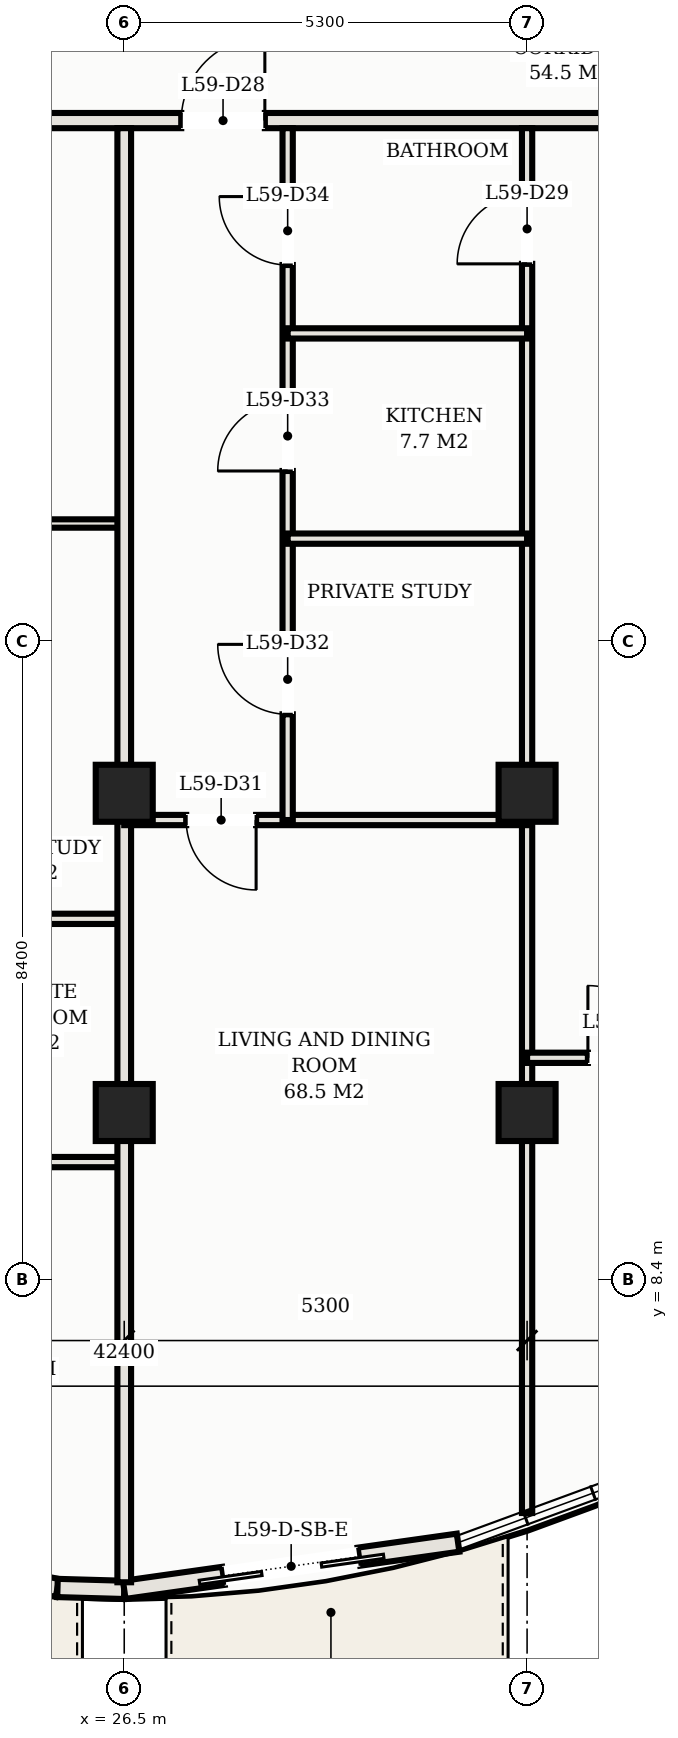
"""IFC4 building model, lengths in metres.
Left out: names, types, materials, properties, quantities, classifications, styles, units other than length and angle.
Written with IfcOpenShell. Run it as: python <this file> out.ifc"""

import sys

from ifc_helpers import new_model, si_unit, direction, frame, frame_2d, origin, origin_2d, place, context, subcontext, project, spatial, rectangle, hollow_rectangle, extrude, element, fill, save


model = new_model("IFC4")
c1 = context("Model", 3, precision=1e-05, world=origin(), true_north=direction((0.0, 1.0)))
c2 = subcontext(c1, "Body", "Model", "MODEL_VIEW")
j1 = project(units=[si_unit("LENGTHUNIT", "METRE"), si_unit("PLANEANGLEUNIT", "RADIAN")], contexts=[c1])
p1 = place(None, origin())
s1 = spatial("IfcSite", under=j1, at=p1, CompositionType="ELEMENT")
p2 = place(p1, origin())
s2 = spatial("IfcBuilding", under=s1, at=p2, CompositionType="ELEMENT")
p3 = place(p2, frame((0.0, 0.0, 216.5)))
s3 = spatial("IfcBuildingStorey", under=s2, at=p3, CompositionType="ELEMENT", Elevation=216.5)
for number, where, z_axis, x_axis in (
    (1, (26.5, 14.8, 0.0), (0.0, 0.0, 1.0), (1.0, 0.0, 0.0)),
    (2, (26.5, 10.6, 0.0), (0.0, 0.0, 1.0), (1.0, 0.0, 0.0)),
    (3, (31.8, 14.8, 0.0), (0.0, 0.0, 1.0), (1.0, 0.0, 0.0)),
    (4, (31.8, 10.6, 0.0), (0.0, 0.0, 1.0), (1.0, 0.0, 0.0)),
):
    element("IfcColumn", number, at=place(p3, frame(where, z_axis=z_axis, x_axis=x_axis)), inside=s3, PredefinedType="COLUMN", context=c2, shape_type="SweptSolid", body=[
        extrude(hollow_rectangle(XDim=0.75, YDim=0.75, WallThickness=0.025, at=origin_2d()), origin(), (0.0, 0.0, 1.0), 3.3),
    ])
p4 = place(p3, frame((21.229, 5.214, 0.0), z_axis=(0.0, 0.0, 1.0), x_axis=(0.980985349685, -0.194081796425, 0.0)))
e5 = element("IfcWall", 5, at=p4, inside=s3, PredefinedType="SOLIDWALL", context=c2, shape_type="SweptSolid", body=[
    extrude(rectangle(XDim=4.478, YDim=0.24, at=frame_2d((2.239, 0.0))), origin(), (0.0, 0.0, 1.0), 3.11),
])
p5 = place(p4, frame((1.381, 0.0, 0.0)))
e6 = element("IfcOpeningElement", 6, at=p5, cuts=e5, PredefinedType="OPENING", context=c2, shape_type="SweptSolid", body=[
    extrude(rectangle(XDim=1.8, YDim=2.2, at=frame_2d((0.9, 1.1))), frame((0.0, 0.13, 0.0), z_axis=(0.0, -1.0, 0.0), x_axis=(1.0, 0.0, 0.0)), (0.0, 0.0, 1.0), 0.26),
])
p6 = place(p3, frame((25.622, 4.345, 0.0), z_axis=(0.0, 0.0, 1.0), x_axis=(0.999597960231, -0.028353446035, 0.0)))
e7 = element("IfcWall", 7, at=p6, inside=s3, PredefinedType="SOLIDWALL", context=c2, shape_type="SweptSolid", body=[
    extrude(rectangle(XDim=0.878, YDim=0.24, at=frame_2d((0.439, 0.0))), origin(), (0.0, 0.0, 1.0), 3.11),
])
p7 = place(p3, frame((26.5, 4.32, 0.0), z_axis=(0.0, 0.0, 1.0), x_axis=(0.990156470874, 0.139964864115, 0.0)))
e8 = element("IfcWall", 8, at=p7, inside=s3, PredefinedType="SOLIDWALL", context=c2, shape_type="SweptSolid", body=[
    extrude(rectangle(XDim=4.436, YDim=0.24, at=frame_2d((2.218, 0.0))), origin(), (0.0, 0.0, 1.0), 3.11),
])
p8 = place(p7, frame((1.318, 0.0, 0.0)))
e9 = element("IfcOpeningElement", 9, at=p8, cuts=e8, PredefinedType="OPENING", context=c2, shape_type="SweptSolid", body=[
    extrude(rectangle(XDim=1.8, YDim=2.2, at=frame_2d((0.9, 1.1))), frame((0.0, 0.13, 0.0), z_axis=(0.0, -1.0, 0.0), x_axis=(1.0, 0.0, 0.0)), (0.0, 0.0, 1.0), 0.26),
])
p9 = place(p3, frame((6.72, 23.65, 0.0), z_axis=(0.0, 0.0, 1.0), x_axis=(1.0, 0.0, 0.0)))
e10 = element("IfcWall", 10, at=p9, inside=s3, PredefinedType="PARTITIONING", context=c2, shape_type="SweptSolid", body=[
    extrude(rectangle(XDim=39.56, YDim=0.2, at=frame_2d((19.78, 0.0))), origin(), (0.0, 0.0, 1.0), 2.43),
])
p10 = place(p9, frame((4.63, 0.0, 0.0)))
e11 = element("IfcOpeningElement", 11, at=p10, cuts=e10, PredefinedType="OPENING", context=c2, shape_type="SweptSolid", body=[
    extrude(rectangle(XDim=1.1, YDim=2.25, at=frame_2d((0.55, 1.125))), frame((0.0, 0.11, 0.0), z_axis=(0.0, -1.0, 0.0), x_axis=(1.0, 0.0, 0.0)), (0.0, 0.0, 1.0), 0.22),
])
p11 = place(p9, frame((20.53, 0.0, 0.0)))
e12 = element("IfcOpeningElement", 12, at=p11, cuts=e10, PredefinedType="OPENING", context=c2, shape_type="SweptSolid", body=[
    extrude(rectangle(XDim=1.1, YDim=2.25, at=frame_2d((0.55, 1.125))), frame((0.0, 0.11, 0.0), z_axis=(0.0, -1.0, 0.0), x_axis=(1.0, 0.0, 0.0)), (0.0, 0.0, 1.0), 0.22),
])
p12 = place(p9, frame((2.085, 0.0, 0.0)))
e13 = element("IfcOpeningElement", 13, at=p12, cuts=e10, PredefinedType="OPENING", context=c2, shape_type="SweptSolid", body=[
    extrude(rectangle(XDim=0.92, YDim=2.15, at=frame_2d((0.46, 1.075))), frame((0.0, 0.11, 0.0), z_axis=(0.0, -1.0, 0.0), x_axis=(1.0, 0.0, 0.0)), (0.0, 0.0, 1.0), 0.22),
])
p13 = place(p9, frame((36.555, 0.0, 0.0)))
e14 = element("IfcOpeningElement", 14, at=p13, cuts=e10, PredefinedType="OPENING", context=c2, shape_type="SweptSolid", body=[
    extrude(rectangle(XDim=0.92, YDim=2.15, at=frame_2d((0.46, 1.075))), frame((0.0, 0.11, 0.0), z_axis=(0.0, -1.0, 0.0), x_axis=(1.0, 0.0, 0.0)), (0.0, 0.0, 1.0), 0.22),
])
p14 = place(p3, frame((21.2, 9.948, 0.0), z_axis=(0.0, 0.0, 1.0), x_axis=(1.0, 0.0, 0.0)))
e15 = element("IfcWall", 15, at=p14, inside=s3, PredefinedType="PARTITIONING", context=c2, shape_type="SweptSolid", body=[
    extrude(rectangle(XDim=5.3, YDim=0.135, at=frame_2d((2.65, 0.0))), origin(), (0.0, 0.0, 1.0), 2.43),
])
p15 = place(p14, frame((0.8, 0.0, 0.0)))
e16 = element("IfcOpeningElement", 16, at=p15, cuts=e15, PredefinedType="OPENING", context=c2, shape_type="SweptSolid", body=[
    extrude(rectangle(XDim=0.95, YDim=2.15, at=frame_2d((0.475, 1.075))), frame((0.0, 0.078, 0.0), z_axis=(0.0, -1.0, 0.0), x_axis=(1.0, 0.0, 0.0)), (0.0, 0.0, 1.0), 0.155),
])
p16 = place(p14, frame((2.875, 0.0, 0.0)))
e17 = element("IfcOpeningElement", 17, at=p16, cuts=e15, PredefinedType="OPENING", context=c2, shape_type="SweptSolid", body=[
    extrude(rectangle(XDim=0.9, YDim=2.15, at=frame_2d((0.45, 1.075))), frame((0.0, 0.078, 0.0), z_axis=(0.0, -1.0, 0.0), x_axis=(1.0, 0.0, 0.0)), (0.0, 0.0, 1.0), 0.155),
])
p17 = place(p3, frame((23.35, 13.148, 0.0), z_axis=(0.0, 0.0, 1.0), x_axis=(1.0, 0.0, 0.0)))
e18 = element("IfcWall", 18, at=p17, inside=s3, PredefinedType="PARTITIONING", context=c2, shape_type="SweptSolid", body=[
    extrude(rectangle(XDim=3.15, YDim=0.135, at=frame_2d((1.575, 0.0))), origin(), (0.0, 0.0, 1.0), 2.43),
])
p18 = place(p3, frame((23.35, 18.349, 0.0), z_axis=(0.0, 0.0, 1.0), x_axis=(1.0, 0.0, 0.0)))
e19 = element("IfcWall", 19, at=p18, inside=s3, PredefinedType="MOVABLE", context=c2, shape_type="SweptSolid", body=[
    extrude(rectangle(XDim=3.15, YDim=0.11, at=frame_2d((1.575, 0.0))), origin(), (0.0, 0.0, 1.0), 2.43),
])
p19 = place(p18, frame((1.115, 0.0, 0.0)))
e20 = element("IfcOpeningElement", 20, at=p19, cuts=e19, PredefinedType="OPENING", context=c2, shape_type="SweptSolid", body=[
    extrude(rectangle(XDim=0.92, YDim=2.15, at=frame_2d((0.46, 1.075))), frame((0.0, 0.065, 0.0), z_axis=(0.0, -1.0, 0.0), x_axis=(1.0, 0.0, 0.0)), (0.0, 0.0, 1.0), 0.13),
])
p20 = place(p3, frame((26.5, 4.42, 0.0), z_axis=(0.0, 0.0, 1.0), x_axis=(0.0, 1.0, 0.0)))
e21 = element("IfcWall", 21, at=p20, inside=s3, PredefinedType="PARTITIONING", context=c2, shape_type="SweptSolid", body=[
    extrude(rectangle(XDim=19.13, YDim=0.18, at=frame_2d((9.565, 0.0))), origin(), (0.0, 0.0, 1.0), 2.43),
])
p21 = place(p3, frame((31.8, 5.331, 0.0), z_axis=(0.0, 0.0, 1.0), x_axis=(0.0, 1.0, 0.0)))
e22 = element("IfcWall", 22, at=p21, inside=s3, PredefinedType="PARTITIONING", context=c2, shape_type="SweptSolid", body=[
    extrude(rectangle(XDim=18.219, YDim=0.135, at=frame_2d((9.109, 0.0))), origin(), (0.0, 0.0, 1.0), 2.43),
])
p22 = place(p21, frame((16.434, 0.0, 0.0)))
e23 = element("IfcOpeningElement", 23, at=p22, cuts=e22, PredefinedType="OPENING", context=c2, shape_type="SweptSolid", body=[
    extrude(rectangle(XDim=0.92, YDim=2.15, at=frame_2d((0.46, 1.075))), frame((0.0, 0.078, 0.0), z_axis=(0.0, -1.0, 0.0), x_axis=(1.0, 0.0, 0.0)), (0.0, 0.0, 1.0), 0.155),
])
p23 = place(p3, frame((26.5, 14.448, 0.0), z_axis=(0.0, 0.0, 1.0), x_axis=(1.0, 0.0, 0.0)))
e24 = element("IfcWall", 24, at=p23, inside=s3, PredefinedType="PARTITIONING", context=c2, shape_type="SweptSolid", body=[
    extrude(rectangle(XDim=5.3, YDim=0.135, at=frame_2d((2.65, 0.0))), origin(), (0.0, 0.0, 1.0), 2.43),
])
p24 = place(p23, frame((0.815, 0.0, 0.0)))
e25 = element("IfcOpeningElement", 25, at=p24, cuts=e24, PredefinedType="OPENING", context=c2, shape_type="SweptSolid", body=[
    extrude(rectangle(XDim=0.92, YDim=2.15, at=frame_2d((0.46, 1.075))), frame((0.0, 0.078, 0.0), z_axis=(0.0, -1.0, 0.0), x_axis=(1.0, 0.0, 0.0)), (0.0, 0.0, 1.0), 0.155),
])
p25 = place(p3, frame((28.65, 14.448, 0.0), z_axis=(0.0, 0.0, 1.0), x_axis=(0.0, 1.0, 0.0)))
e26 = element("IfcWall", 26, at=p25, inside=s3, PredefinedType="PARTITIONING", context=c2, shape_type="SweptSolid", body=[
    extrude(rectangle(XDim=9.102, YDim=0.135, at=frame_2d((4.551, 0.0))), origin(), (0.0, 0.0, 1.0), 2.43),
])
p26 = place(p25, frame((1.391, 0.0, 0.0)))
e27 = element("IfcOpeningElement", 27, at=p26, cuts=e26, PredefinedType="OPENING", context=c2, shape_type="SweptSolid", body=[
    extrude(rectangle(XDim=0.92, YDim=2.15, at=frame_2d((0.46, 1.075))), frame((0.0, 0.078, 0.0), z_axis=(0.0, -1.0, 0.0), x_axis=(1.0, 0.0, 0.0)), (0.0, 0.0, 1.0), 0.155),
])
p27 = place(p25, frame((4.592, 0.0, 0.0)))
e28 = element("IfcOpeningElement", 28, at=p27, cuts=e26, PredefinedType="OPENING", context=c2, shape_type="SweptSolid", body=[
    extrude(rectangle(XDim=0.92, YDim=2.15, at=frame_2d((0.46, 1.075))), frame((0.0, 0.078, 0.0), z_axis=(0.0, -1.0, 0.0), x_axis=(1.0, 0.0, 0.0)), (0.0, 0.0, 1.0), 0.155),
])
p28 = place(p25, frame((7.302, 0.0, 0.0)))
e29 = element("IfcOpeningElement", 29, at=p28, cuts=e26, PredefinedType="OPENING", context=c2, shape_type="SweptSolid", body=[
    extrude(rectangle(XDim=0.9, YDim=2.15, at=frame_2d((0.45, 1.075))), frame((0.0, 0.078, 0.0), z_axis=(0.0, -1.0, 0.0), x_axis=(1.0, 0.0, 0.0)), (0.0, 0.0, 1.0), 0.155),
])
for number, where, z_axis, x_axis in (
    (30, (28.65, 18.15, 0.0), (0.0, 0.0, 1.0), (1.0, 0.0, 0.0)),
    (31, (28.65, 20.85, 0.0), (0.0, 0.0, 1.0), (1.0, 0.0, 0.0)),
):
    element("IfcWall", number, at=place(p3, frame(where, z_axis=z_axis, x_axis=x_axis)), inside=s3, PredefinedType="PARTITIONING", context=c2, shape_type="SweptSolid", body=[
        extrude(rectangle(XDim=3.15, YDim=0.135, at=frame_2d((1.575, 0.0))), origin(), (0.0, 0.0, 1.0), 2.43),
    ])
p29 = place(p3, frame((31.8, 11.32, 0.0), z_axis=(0.0, 0.0, 1.0), x_axis=(1.0, 0.0, 0.0)))
e32 = element("IfcWall", 32, at=p29, inside=s3, PredefinedType="PARTITIONING", context=c2, shape_type="SweptSolid", body=[
    extrude(rectangle(XDim=5.3, YDim=0.135, at=frame_2d((2.65, 0.0))), origin(), (0.0, 0.0, 1.0), 2.43),
])
p30 = place(p29, frame((0.8, 0.0, 0.0)))
e33 = element("IfcOpeningElement", 33, at=p30, cuts=e32, PredefinedType="OPENING", context=c2, shape_type="SweptSolid", body=[
    extrude(rectangle(XDim=0.95, YDim=2.15, at=frame_2d((0.475, 1.075))), frame((0.0, 0.078, 0.0), z_axis=(0.0, -1.0, 0.0), x_axis=(1.0, 0.0, 0.0)), (0.0, 0.0, 1.0), 0.155),
])
p31 = place(p29, frame((2.875, 0.0, 0.0)))
e34 = element("IfcOpeningElement", 34, at=p31, cuts=e32, PredefinedType="OPENING", context=c2, shape_type="SweptSolid", body=[
    extrude(rectangle(XDim=0.9, YDim=2.15, at=frame_2d((0.45, 1.075))), frame((0.0, 0.078, 0.0), z_axis=(0.0, -1.0, 0.0), x_axis=(1.0, 0.0, 0.0)), (0.0, 0.0, 1.0), 0.155),
])
p32 = place(p8, frame((1.8, 0.0, 0.0), z_axis=(0.0, 0.0, 1.0), x_axis=(-1.0, 0.0, 0.0)))
e35 = element("IfcDoor", 35, at=p32, inside=s3, OperationType="DOUBLE_DOOR_SLIDING", PredefinedType="DOOR", context=c2, shape_type="SweptSolid", body=[
    extrude(rectangle(XDim=1.8, YDim=2.2, at=frame_2d((0.9, 1.1))), frame((0.0, 0.025, 0.0), z_axis=(0.0, -1.0, 0.0), x_axis=(1.0, 0.0, 0.0)), (0.0, 0.0, 1.0), 0.05),
])
fill(e9, e35)
p33 = place(p11, origin())
e36 = element("IfcDoor", 36, at=p33, inside=s3, OperationType="SINGLE_SWING_RIGHT", PredefinedType="DOOR", context=c2, shape_type="SweptSolid", body=[
    extrude(rectangle(XDim=1.1, YDim=2.25, at=frame_2d((0.55, 1.125))), frame((0.0, 0.025, 0.0), z_axis=(0.0, -1.0, 0.0), x_axis=(1.0, 0.0, 0.0)), (0.0, 0.0, 1.0), 0.05),
])
fill(e12, e36)
p34 = place(p22, origin())
e37 = element("IfcDoor", 37, at=p34, inside=s3, OperationType="SINGLE_SWING_LEFT", PredefinedType="DOOR", context=c2, shape_type="SweptSolid", body=[
    extrude(rectangle(XDim=0.92, YDim=2.15, at=frame_2d((0.46, 1.075))), frame((0.0, 0.025, 0.0), z_axis=(0.0, -1.0, 0.0), x_axis=(1.0, 0.0, 0.0)), (0.0, 0.0, 1.0), 0.05),
])
fill(e23, e37)
p35 = place(p24, frame((0.92, 0.0, 0.0), z_axis=(0.0, 0.0, 1.0), x_axis=(-1.0, 0.0, 0.0)))
e38 = element("IfcDoor", 38, at=p35, inside=s3, OperationType="SINGLE_SWING_LEFT", PredefinedType="DOOR", context=c2, shape_type="SweptSolid", body=[
    extrude(rectangle(XDim=0.92, YDim=2.15, at=frame_2d((0.46, 1.075))), frame((0.0, 0.025, 0.0), z_axis=(0.0, -1.0, 0.0), x_axis=(1.0, 0.0, 0.0)), (0.0, 0.0, 1.0), 0.05),
])
fill(e25, e38)
p36 = place(p26, origin())
e39 = element("IfcDoor", 39, at=p36, inside=s3, OperationType="SINGLE_SWING_RIGHT", PredefinedType="DOOR", context=c2, shape_type="SweptSolid", body=[
    extrude(rectangle(XDim=0.92, YDim=2.15, at=frame_2d((0.46, 1.075))), frame((0.0, 0.025, 0.0), z_axis=(0.0, -1.0, 0.0), x_axis=(1.0, 0.0, 0.0)), (0.0, 0.0, 1.0), 0.05),
])
fill(e27, e39)
p37 = place(p27, origin())
e40 = element("IfcDoor", 40, at=p37, inside=s3, OperationType="SINGLE_SWING_LEFT", PredefinedType="DOOR", context=c2, shape_type="SweptSolid", body=[
    extrude(rectangle(XDim=0.92, YDim=2.15, at=frame_2d((0.46, 1.075))), frame((0.0, 0.025, 0.0), z_axis=(0.0, -1.0, 0.0), x_axis=(1.0, 0.0, 0.0)), (0.0, 0.0, 1.0), 0.05),
])
fill(e28, e40)
p38 = place(p28, origin())
e41 = element("IfcDoor", 41, at=p38, inside=s3, OperationType="SINGLE_SWING_RIGHT", PredefinedType="DOOR", context=c2, shape_type="SweptSolid", body=[
    extrude(rectangle(XDim=0.9, YDim=2.15, at=frame_2d((0.45, 1.075))), frame((0.0, 0.025, 0.0), z_axis=(0.0, -1.0, 0.0), x_axis=(1.0, 0.0, 0.0)), (0.0, 0.0, 1.0), 0.05),
])
fill(e29, e41)
p39 = place(p30, origin())
e42 = element("IfcDoor", 42, at=p39, inside=s3, OperationType="SINGLE_SWING_LEFT", PredefinedType="DOOR", context=c2, shape_type="SweptSolid", body=[
    extrude(rectangle(XDim=0.95, YDim=2.15, at=frame_2d((0.475, 1.075))), frame((0.0, 0.025, 0.0), z_axis=(0.0, -1.0, 0.0), x_axis=(1.0, 0.0, 0.0)), (0.0, 0.0, 1.0), 0.05),
])
fill(e33, e42)
save(model, sys.argv[1])
